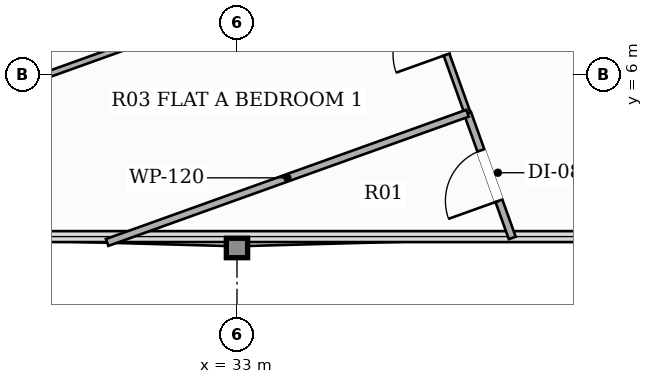
"""IFC4 building model, lengths in metres.
Left out: names, types, materials, properties, quantities, classifications, styles, units other than length and angle.
Written with IfcOpenShell. Run it as: python <this file> out.ifc"""

import sys

from ifc_helpers import new_model, si_unit, direction, frame, frame_2d, origin, place, context, subcontext, project, spatial, rectangle, extrude, element, fill, save


model = new_model("IFC4")
c1 = context("Model", 3, precision=1e-05, world=origin(), true_north=direction((0.0, 1.0)))
c2 = subcontext(c1, "Body", "Model", "MODEL_VIEW")
j1 = project(units=[si_unit("LENGTHUNIT", "METRE"), si_unit("PLANEANGLEUNIT", "RADIAN")], contexts=[c1])
p1 = place(None, origin())
s1 = spatial("IfcSite", under=j1, at=p1, CompositionType="ELEMENT")
p2 = place(p1, origin())
s2 = spatial("IfcBuilding", under=s1, at=p2, CompositionType="ELEMENT")
p3 = place(p2, frame((0.0, 0.0, 136.4)))
s3 = spatial("IfcBuildingStorey", under=s2, at=p3, CompositionType="ELEMENT", Elevation=136.4)
p4 = place(p3, frame((27.521, 3.342, 0.0), z_axis=(0.0, 0.0, 1.0), x_axis=(0.197768112081, 0.980248832615, 0.0)))
e1 = element("IfcWall", 1, at=p4, inside=s3, PredefinedType="PARTITIONING", context=c2, shape_type="SweptSolid", body=[
    extrude(rectangle(XDim=12.333, YDim=0.2, at=frame_2d((6.166, 0.0))), origin(), (0.0, 0.0, 1.0), 2.413),
])
p5 = place(p3, frame((38.101, 23.79, 0.0), z_axis=(0.0, 0.0, 1.0), x_axis=(0.605201904092, -0.796072016393, 0.0)))
e2 = element("IfcWall", 2, at=p5, inside=s3, PredefinedType="PARTITIONING", context=c2, shape_type="SweptSolid", body=[
    extrude(rectangle(XDim=23.896, YDim=0.2, at=frame_2d((11.948, 0.0))), origin(), (0.0, 0.0, 1.0), 2.413),
])
p6 = place(p3, frame((37.527, 3.315, 0.0), z_axis=(0.0, 0.0, 1.0), x_axis=(-0.337393850622, 0.9413635799, 0.0)))
e3 = element("IfcWall", 3, at=p6, inside=s3, PredefinedType="PARTITIONING", context=c2, shape_type="SweptSolid", body=[
    extrude(rectangle(XDim=2.179, YDim=0.12, at=frame_2d((1.089, 0.0))), origin(), (0.0, 0.0, 1.0), 3.06),
])
p7 = place(p6, frame((0.649, 0.0, 0.0)))
e4 = element("IfcOpeningElement", 4, at=p7, cuts=e3, PredefinedType="OPENING", context=c2, shape_type="SweptSolid", body=[
    extrude(rectangle(XDim=0.88, YDim=2.1, at=frame_2d((0.44, 1.05))), frame((0.0, 0.07, 0.0), z_axis=(0.0, -1.0, 0.0), x_axis=(1.0, 0.0, 0.0)), (0.0, 0.0, 1.0), 0.14),
])
p8 = place(p3, frame((36.792, 5.366, 0.0), z_axis=(0.0, 0.0, 1.0), x_axis=(-0.33735537207, 0.941377370099, 0.0)))
e5 = element("IfcWall", 5, at=p8, inside=s3, PredefinedType="PARTITIONING", context=c2, shape_type="SweptSolid", body=[
    extrude(rectangle(XDim=2.929, YDim=0.1, at=frame_2d((1.464, 0.0))), origin(), (0.0, 0.0, 1.0), 2.413),
])
p9 = place(p8, frame((1.024, 0.0, 0.0)))
e6 = element("IfcOpeningElement", 6, at=p9, cuts=e5, PredefinedType="OPENING", context=c2, shape_type="SweptSolid", body=[
    extrude(rectangle(XDim=0.88, YDim=2.1, at=frame_2d((0.44, 1.05))), frame((0.0, 0.06, 0.0), z_axis=(0.0, -1.0, 0.0), x_axis=(1.0, 0.0, 0.0)), (0.0, 0.0, 1.0), 0.12),
])
p10 = place(p3, frame((30.865, 3.241, 0.0), z_axis=(0.0, 0.0, 1.0), x_axis=(0.941328015911, 0.337493061354, 0.0)))
e7 = element("IfcWall", 7, at=p10, inside=s3, PredefinedType="PARTITIONING", context=c2, shape_type="SweptSolid", body=[
    extrude(rectangle(XDim=6.296, YDim=0.12, at=frame_2d((3.148, 0.0))), origin(), (0.0, 0.0, 1.0), 2.619),
])
p11 = place(p3, frame((28.008, 5.328, 0.0), z_axis=(0.0, 0.0, 1.0), x_axis=(0.941323677897, 0.337505160599, 0.0)))
e8 = element("IfcWall", 8, at=p11, inside=s3, PredefinedType="PARTITIONING", context=c2, shape_type="SweptSolid", body=[
    extrude(rectangle(XDim=8.282, YDim=0.1, at=frame_2d((4.141, 0.0))), origin(), (0.0, 0.0, 1.0), 2.413),
])
p12 = place(p7, origin())
e9 = element("IfcDoor", 9, at=p12, inside=s3, OperationType="SINGLE_SWING_LEFT", PredefinedType="DOOR", context=c2, shape_type="SweptSolid", body=[
    extrude(rectangle(XDim=0.88, YDim=2.1, at=frame_2d((0.44, 1.05))), frame((0.0, 0.025, 0.0), z_axis=(0.0, -1.0, 0.0), x_axis=(1.0, 0.0, 0.0)), (0.0, 0.0, 1.0), 0.05),
])
fill(e4, e9)
p13 = place(p9, origin())
e10 = element("IfcDoor", 10, at=p13, inside=s3, OperationType="SINGLE_SWING_LEFT", PredefinedType="DOOR", context=c2, shape_type="SweptSolid", body=[
    extrude(rectangle(XDim=0.88, YDim=2.1, at=frame_2d((0.44, 1.05))), frame((0.0, 0.025, 0.0), z_axis=(0.0, -1.0, 0.0), x_axis=(1.0, 0.0, 0.0)), (0.0, 0.0, 1.0), 0.05),
])
fill(e6, e10)
save(model, sys.argv[1])
